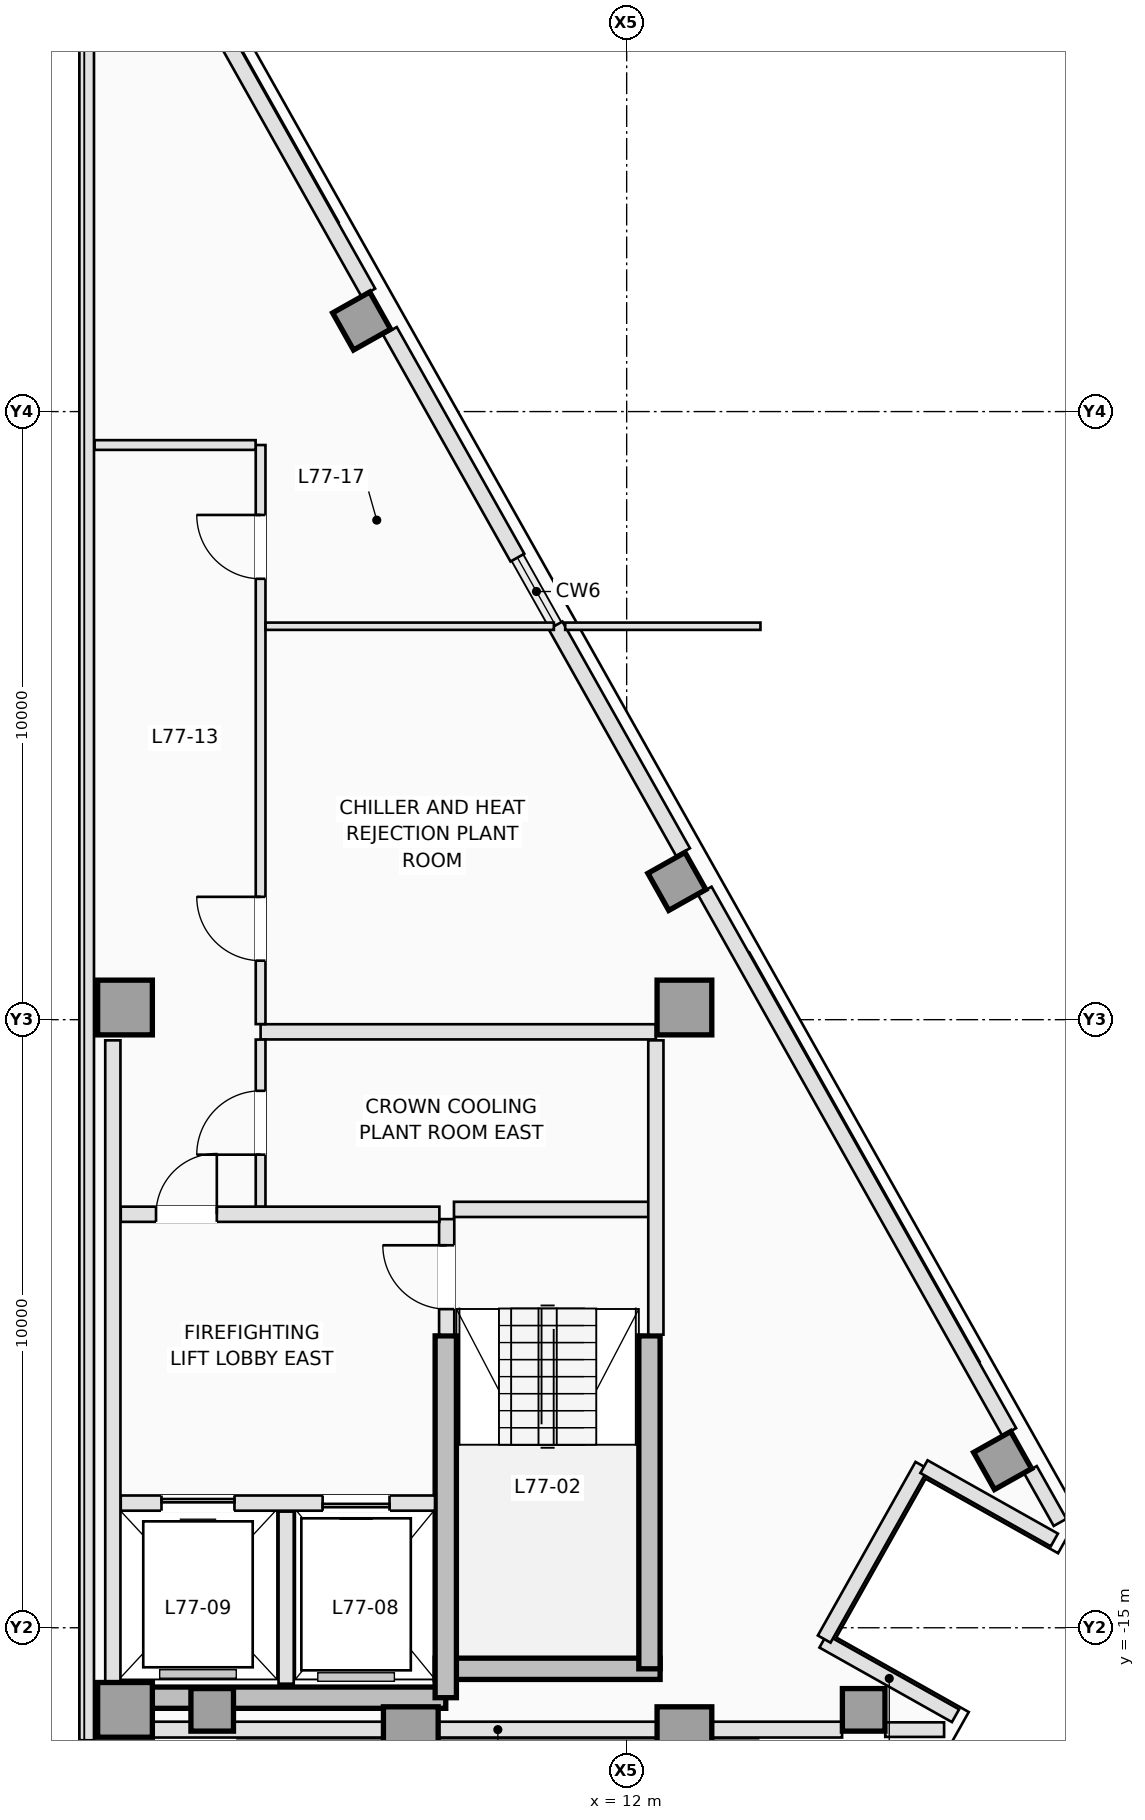
"""IFC4 building model, lengths in metres.
Left out: names, types, materials, properties, quantities, classifications, styles, units other than length and angle.
Written with IfcOpenShell. Run it as: python <this file> out.ifc"""

import sys

from ifc_helpers import new_model, si_unit, direction, frame, frame_2d, origin, origin_2d, place, context, subcontext, project, spatial, rectangle, extrude, element, fill, save


model = new_model("IFC4")
c1 = context("Model", 3, precision=1e-05, world=origin(), true_north=direction((0.0, 1.0)))
c2 = subcontext(c1, "Body", "Model", "MODEL_VIEW")
j1 = project(units=[si_unit("LENGTHUNIT", "METRE"), si_unit("PLANEANGLEUNIT", "RADIAN")], contexts=[c1])
p1 = place(None, origin())
s1 = spatial("IfcSite", under=j1, at=p1, CompositionType="ELEMENT")
p2 = place(p1, origin())
s2 = spatial("IfcBuilding", under=s1, at=p2, CompositionType="ELEMENT")
p3 = place(p2, frame((0.0, 0.0, 277.3)))
s3 = spatial("IfcBuildingStorey", under=s2, at=p3, CompositionType="ELEMENT", Elevation=277.3)
p4 = place(p3, frame((3.75, -16.15, 0.0), z_axis=(0.0, 0.0, 1.0), x_axis=(1.0, 0.0, 0.0)))
e1 = element("IfcWall", 1, at=p4, inside=s3, PredefinedType="SHEAR", context=c2, shape_type="SweptSolid", body=[
    extrude(rectangle(XDim=5.275, YDim=0.35, at=frame_2d((2.637, 0.0))), origin(), (0.0, 0.0, 1.0), 3.2),
])
p5 = place(p3, frame((8.85, -15.675, 0.0), z_axis=(0.0, 0.0, 1.0), x_axis=(1.0, 0.0, 0.0)))
e2 = element("IfcWall", 2, at=p5, inside=s3, PredefinedType="SHEAR", context=c2, shape_type="SweptSolid", body=[
    extrude(rectangle(XDim=3.7, YDim=0.35, at=frame_2d((1.85, 0.0))), origin(), (0.0, 0.0, 1.0), 3.2),
])
p6 = place(p3, frame((12.375, -15.675, 0.0), z_axis=(0.0, 0.0, 1.0), x_axis=(0.0, 1.0, 0.0)))
e3 = element("IfcWall", 3, at=p6, inside=s3, PredefinedType="SHEAR", context=c2, shape_type="SweptSolid", body=[
    extrude(rectangle(XDim=5.475, YDim=0.35, at=frame_2d((2.738, 0.0))), origin(), (0.0, 0.0, 1.0), 3.2),
])
p7 = place(p3, frame((9.025, -16.15, 0.0), z_axis=(0.0, 0.0, 1.0), x_axis=(0.0, 1.0, 0.0)))
e4 = element("IfcWall", 4, at=p7, inside=s3, PredefinedType="SHEAR", context=c2, shape_type="SweptSolid", body=[
    extrude(rectangle(XDim=5.95, YDim=0.35, at=frame_2d((2.975, 0.0))), origin(), (0.0, 0.0, 1.0), 3.2),
])
for number, where, z_axis, x_axis in (
    (5, (3.75, -16.35, 0.0), (0.0, 0.0, 1.0), (1.0, 0.0, 0.0)),
    (6, (8.45, -16.75, 0.0), (0.0, 0.0, 1.0), (1.0, 0.0, 0.0)),
    (7, (12.95, -16.75, 0.0), (0.0, 0.0, 1.0), (1.0, 0.0, 0.0)),
    (8, (3.75, -4.8, 0.0), (0.0, 0.0, 1.0), (1.0, 0.0, 0.0)),
    (9, (12.95, -4.8, 0.0), (0.0, 0.0, 1.0), (1.0, 0.0, 0.0)),
):
    element("IfcColumn", number, at=place(p3, frame(where, z_axis=z_axis, x_axis=x_axis)), inside=s3, PredefinedType="COLUMN", context=c2, shape_type="SweptSolid", body=[
        extrude(rectangle(XDim=0.9, YDim=0.9, at=origin_2d()), origin(), (0.0, 0.0, 1.0), 3.2),
    ])
for number, where, z_axis, x_axis in (
    (10, (5.184, -16.35, 0.0), (0.0, 0.0, 1.0), (0.0, 1.0, 0.0)),
    (11, (15.898, -16.35, 0.0), (0.0, 0.0, 1.0), (0.0, 1.0, 0.0)),
    (12, (18.182, -12.25, 0.0), (0.0, 0.0, 1.0), (0.872, 0.49, 0.0)),
    (13, (12.825, -2.727, 0.0), (0.0, 0.0, 1.0), (0.872, 0.49, 0.0)),
    (14, (7.642, 6.489, 0.0), (0.0, 0.0, 1.0), (0.872, 0.49, 0.0)),
):
    element("IfcColumn", number, at=place(p3, frame(where, z_axis=z_axis, x_axis=x_axis)), inside=s3, PredefinedType="COLUMN", context=c2, shape_type="SweptSolid", body=[
        extrude(rectangle(XDim=0.7, YDim=0.7, at=origin_2d()), origin(), (0.0, 0.0, 1.0), 3.2),
    ])
p8 = place(p3, frame((17.22, -16.675, 0.0), z_axis=(0.0, 0.0, 1.0), x_axis=(-1.0, 0.0, 0.0)))
e15 = element("IfcWall", 15, at=p8, inside=s3, PredefinedType="STANDARD", context=c2, shape_type="SweptSolid", body=[
    extrude(rectangle(XDim=0.967, YDim=0.24, at=frame_2d((0.484, 0.0))), origin(), (0.0, 0.0, 1.0), 2.88),
])
p9 = place(p3, frame((15.542, -16.675, 0.0), z_axis=(0.0, 0.0, 1.0), x_axis=(-1.0, 0.0, 0.0)))
e16 = element("IfcWall", 16, at=p9, inside=s3, PredefinedType="STANDARD", context=c2, shape_type="SweptSolid", body=[
    extrude(rectangle(XDim=11.323, YDim=0.26, at=frame_2d((5.661, 0.0))), origin(), (0.0, 0.0, 1.0), 2.164),
])
p10 = place(p3, frame((18.639, -12.4, 0.0), z_axis=(0.0, 0.0, 1.0), x_axis=(0.490261239633, -0.871575537125, 0.0)))
e17 = element("IfcWall", 17, at=p10, inside=s3, PredefinedType="STANDARD", context=c2, shape_type="SweptSolid", body=[
    extrude(rectangle(XDim=0.995, YDim=0.24, at=frame_2d((0.498, 0.0))), origin(), (0.0, 0.0, 1.0), 2.88),
])
p11 = place(p3, frame((2.742, 15.863, 0.0), z_axis=(0.0, 0.0, 1.0), x_axis=(0.490260105081, -0.871576175309, 0.0)))
e18 = element("IfcWall", 18, at=p11, inside=s3, PredefinedType="STANDARD", context=c2, shape_type="SweptSolid", body=[
    extrude(rectangle(XDim=10.217, YDim=0.26, at=frame_2d((5.108, 0.0))), origin(), (0.0, 0.0, 1.0), 2.88),
])
p12 = place(p3, frame((13.283, -2.877, 0.0), z_axis=(0.0, 0.0, 1.0), x_axis=(0.490270316201, -0.871570431492, 0.0)))
e19 = element("IfcWall", 19, at=p12, inside=s3, PredefinedType="STANDARD", context=c2, shape_type="SweptSolid", body=[
    extrude(rectangle(XDim=10.216, YDim=0.26, at=frame_2d((5.108, 0.0))), origin(), (0.0, 0.0, 1.0), 2.88),
])
p13 = place(p3, frame((8.106, 6.326, 0.0), z_axis=(0.0, 0.0, 1.0), x_axis=(0.490244979871, -0.871584683041, 0.0)))
e20 = element("IfcWall", 20, at=p13, inside=s3, PredefinedType="STANDARD", context=c2, shape_type="SweptSolid", body=[
    extrude(rectangle(XDim=4.277, YDim=0.26, at=frame_2d((2.139, 0.0))), origin(), (0.0, 0.0, 1.0), 2.88),
])
p14 = place(p3, frame((10.83, 1.483, 0.0), z_axis=(0.0, 0.0, 1.0), x_axis=(0.490220591932, -0.871598400209, 0.0)))
e21 = element("IfcWall", 21, at=p14, inside=s3, PredefinedType="STANDARD", context=c2, shape_type="SweptSolid", body=[
    extrude(rectangle(XDim=4.278, YDim=0.26, at=frame_2d((2.139, 0.0))), origin(), (0.0, 0.0, 1.0), 2.88),
])
p15 = place(p3, frame((17.408, -16.447, 0.0), z_axis=(0.0, 0.0, 1.0), x_axis=(-0.871588577066, 0.490238056792, 0.0)))
e22 = element("IfcWall", 22, at=p15, inside=s3, PredefinedType="STANDARD", context=c2, shape_type="SweptSolid", body=[
    extrude(rectangle(XDim=2.5, YDim=0.24, at=frame_2d((1.25, 0.0))), origin(), (0.0, 0.0, 1.0), 2.88),
])
p16 = place(p3, frame((15.248, -15.186, 0.0), z_axis=(0.0, 0.0, 1.0), x_axis=(0.490293083368, 0.871557624258, 0.0)))
e23 = element("IfcWall", 23, at=p16, inside=s3, PredefinedType="STANDARD", context=c2, shape_type="SweptSolid", body=[
    extrude(rectangle(XDim=3.276, YDim=0.24, at=frame_2d((1.638, 0.0))), origin(), (0.0, 0.0, 1.0), 2.164),
])
p17 = place(p3, frame((16.889, -12.35, 0.0), z_axis=(0.0, 0.0, 1.0), x_axis=(0.87157023615, -0.490270663468, 0.0)))
e24 = element("IfcWall", 24, at=p17, inside=s3, PredefinedType="STANDARD", context=c2, shape_type="SweptSolid", body=[
    extrude(rectangle(XDim=2.46, YDim=0.24, at=frame_2d((1.23, 0.0))), origin(), (0.0, 0.0, 1.0), 2.88),
])
p18 = place(p3, frame((3.12, -16.85, 0.0), z_axis=(0.0, 0.0, 1.0), x_axis=(0.0, 1.0, 0.0)))
e25 = element("IfcWall", 25, at=p18, inside=s3, PredefinedType="STANDARD", context=c2, shape_type="SweptSolid", body=[
    extrude(rectangle(XDim=34.05, YDim=0.24, at=frame_2d((17.025, 0.0))), origin(), (0.0, 0.0, 1.0), 2.164),
])
p19 = place(p3, frame((9.04, -10.18, 0.0), z_axis=(0.0, 0.0, 1.0), x_axis=(0.0, 1.0, 0.0)))
e26 = element("IfcWall", 26, at=p19, inside=s3, PredefinedType="PARTITIONING", context=c2, shape_type="SweptSolid", body=[
    extrude(rectangle(XDim=1.9, YDim=0.25, at=frame_2d((0.95, 0.0))), origin(), (0.0, 0.0, 1.0), 2.88),
])
p20 = place(p19, frame((0.42, 0.0, 0.0)))
e27 = element("IfcOpeningElement", 27, at=p20, cuts=e26, PredefinedType="OPENING", context=c2, shape_type="SweptSolid", body=[
    extrude(rectangle(XDim=1.05, YDim=2.15, at=frame_2d((0.525, 1.075))), frame((0.0, 0.135, 0.0), z_axis=(0.0, -1.0, 0.0), x_axis=(1.0, 0.0, 0.0)), (0.0, 0.0, 1.0), 0.27),
])
p21 = place(p3, frame((9.16, -8.12, 0.0), z_axis=(0.0, 0.0, 1.0), x_axis=(1.0, 0.0, 0.0)))
e28 = element("IfcWall", 28, at=p21, inside=s3, PredefinedType="PARTITIONING", context=c2, shape_type="SweptSolid", body=[
    extrude(rectangle(XDim=3.22, YDim=0.25, at=frame_2d((1.61, 0.0))), origin(), (0.0, 0.0, 1.0), 2.88),
])
p22 = place(p3, frame((12.48, -10.18, 0.0), z_axis=(0.0, 0.0, 1.0), x_axis=(0.0, 1.0, 0.0)))
e29 = element("IfcWall", 29, at=p22, inside=s3, PredefinedType="PARTITIONING", context=c2, shape_type="SweptSolid", body=[
    extrude(rectangle(XDim=4.84, YDim=0.25, at=frame_2d((2.42, 0.0))), origin(), (0.0, 0.0, 1.0), 2.88),
])
p23 = place(p3, frame((3.68, -12.95, 0.0), z_axis=(0.0, 0.0, 1.0), x_axis=(1.0, 0.0, 0.0)))
e30 = element("IfcWall", 30, at=p23, inside=s3, PredefinedType="PARTITIONING", context=c2, shape_type="SweptSolid", body=[
    extrude(rectangle(XDim=5.168, YDim=0.25, at=frame_2d((2.584, 0.0))), origin(), (0.0, 0.0, 1.0), 2.88),
])
p24 = place(p23, frame((3.32, 0.0, 0.0)))
e31 = element("IfcOpeningElement", 31, at=p24, cuts=e30, PredefinedType="OPENING", context=c2, shape_type="SweptSolid", body=[
    extrude(rectangle(XDim=1.1, YDim=2.15, at=frame_2d((0.55, 1.075))), frame((0.0, 0.135, 0.0), z_axis=(0.0, -1.0, 0.0), x_axis=(1.0, 0.0, 0.0)), (0.0, 0.0, 1.0), 0.27),
])
p25 = place(p23, frame((0.67, 0.0, 0.0)))
e32 = element("IfcOpeningElement", 32, at=p25, cuts=e30, PredefinedType="OPENING", context=c2, shape_type="SweptSolid", body=[
    extrude(rectangle(XDim=1.2, YDim=2.15, at=frame_2d((0.6, 1.075))), frame((0.0, 0.135, 0.0), z_axis=(0.0, -1.0, 0.0), x_axis=(1.0, 0.0, 0.0)), (0.0, 0.0, 1.0), 0.27),
])
p26 = place(p3, frame((6.4, -15.92, 0.0), z_axis=(0.0, 0.0, 1.0), x_axis=(0.0, 1.0, 0.0)))
e33 = element("IfcWall", 33, at=p26, inside=s3, PredefinedType="PARTITIONING", context=c2, shape_type="SweptSolid", body=[
    extrude(rectangle(XDim=2.83, YDim=0.25, at=frame_2d((1.415, 0.0))), origin(), (0.0, 0.0, 1.0), 2.88),
])
p27 = place(p3, frame((3.68, -8.2, 0.0), z_axis=(0.0, 0.0, 1.0), x_axis=(1.0, 0.0, 0.0)))
e34 = element("IfcWall", 34, at=p27, inside=s3, PredefinedType="PARTITIONING", context=c2, shape_type="SweptSolid", body=[
    extrude(rectangle(XDim=5.24, YDim=0.25, at=frame_2d((2.62, 0.0))), origin(), (0.0, 0.0, 1.0), 2.88),
])
p28 = place(p27, frame((0.58, 0.0, 0.0)))
e35 = element("IfcOpeningElement", 35, at=p28, cuts=e34, PredefinedType="OPENING", context=c2, shape_type="SweptSolid", body=[
    extrude(rectangle(XDim=1.0, YDim=2.15, at=frame_2d((0.5, 1.075))), frame((0.0, 0.135, 0.0), z_axis=(0.0, -1.0, 0.0), x_axis=(1.0, 0.0, 0.0)), (0.0, 0.0, 1.0), 0.27),
])
p29 = place(p3, frame((3.55, -15.898, 0.0), z_axis=(0.0, 0.0, 1.0), x_axis=(0.0, 1.0, 0.0)))
e36 = element("IfcWall", 36, at=p29, inside=s3, PredefinedType="PARTITIONING", context=c2, shape_type="SweptSolid", body=[
    extrude(rectangle(XDim=10.558, YDim=0.25, at=frame_2d((5.279, 0.0))), origin(), (0.0, 0.0, 1.0), 2.88),
])
p30 = place(p3, frame((5.98, -5.2, 0.0), z_axis=(0.0, 0.0, 1.0), x_axis=(1.0, 0.0, 0.0)))
e37 = element("IfcWall", 37, at=p30, inside=s3, PredefinedType="PARTITIONING", context=c2, shape_type="SweptSolid", body=[
    extrude(rectangle(XDim=6.5, YDim=0.25, at=frame_2d((3.25, 0.0))), origin(), (0.0, 0.0, 1.0), 2.88),
])
p31 = place(p3, frame((5.98, -8.073, 0.0), z_axis=(0.0, 0.0, 1.0), x_axis=(0.0, 1.0, 0.0)))
e38 = element("IfcWall", 38, at=p31, inside=s3, PredefinedType="PARTITIONING", context=c2, shape_type="SweptSolid", body=[
    extrude(rectangle(XDim=2.746, YDim=0.16, at=frame_2d((1.373, 0.0))), origin(), (0.0, 0.0, 1.0), 2.88),
])
p32 = place(p31, frame((0.853, 0.0, 0.0)))
e39 = element("IfcOpeningElement", 39, at=p32, cuts=e38, PredefinedType="OPENING", context=c2, shape_type="SweptSolid", body=[
    extrude(rectangle(XDim=1.05, YDim=2.12, at=frame_2d((0.525, 1.06))), frame((0.0, 0.09, 0.0), z_axis=(0.0, -1.0, 0.0), x_axis=(1.0, 0.0, 0.0)), (0.0, 0.0, 1.0), 0.18),
])
p33 = place(p3, frame((5.98, -5.073, 0.0), z_axis=(0.0, 0.0, 1.0), x_axis=(0.0, 1.0, 0.0)))
e40 = element("IfcWall", 40, at=p33, inside=s3, PredefinedType="PARTITIONING", context=c2, shape_type="SweptSolid", body=[
    extrude(rectangle(XDim=9.523, YDim=0.16, at=frame_2d((4.761, 0.0))), origin(), (0.0, 0.0, 1.0), 2.88),
])
p34 = place(p33, frame((1.043, 0.0, 0.0)))
e41 = element("IfcOpeningElement", 41, at=p34, cuts=e40, PredefinedType="OPENING", context=c2, shape_type="SweptSolid", body=[
    extrude(rectangle(XDim=1.05, YDim=2.12, at=frame_2d((0.525, 1.06))), frame((0.0, 0.09, 0.0), z_axis=(0.0, -1.0, 0.0), x_axis=(1.0, 0.0, 0.0)), (0.0, 0.0, 1.0), 0.18),
])
p35 = place(p33, frame((7.323, 0.0, 0.0)))
e42 = element("IfcOpeningElement", 42, at=p35, cuts=e40, PredefinedType="OPENING", context=c2, shape_type="SweptSolid", body=[
    extrude(rectangle(XDim=1.05, YDim=2.12, at=frame_2d((0.525, 1.06))), frame((0.0, 0.09, 0.0), z_axis=(0.0, -1.0, 0.0), x_axis=(1.0, 0.0, 0.0)), (0.0, 0.0, 1.0), 0.18),
])
p36 = place(p3, frame((3.25, 4.45, 0.0), z_axis=(0.0, 0.0, 1.0), x_axis=(1.0, 0.0, 0.0)))
e43 = element("IfcWall", 43, at=p36, inside=s3, PredefinedType="PARTITIONING", context=c2, shape_type="SweptSolid", body=[
    extrude(rectangle(XDim=2.648, YDim=0.16, at=frame_2d((1.324, 0.0))), origin(), (0.0, 0.0, 1.0), 2.88),
])
p37 = place(p3, frame((6.062, 1.47, 0.0), z_axis=(0.0, 0.0, 1.0), x_axis=(1.0, 0.0, 0.0)))
e44 = element("IfcWall", 44, at=p37, inside=s3, PredefinedType="PARTITIONING", context=c2, shape_type="SweptSolid", body=[
    extrude(rectangle(XDim=4.74, YDim=0.12, at=frame_2d((2.37, 0.0))), origin(), (0.0, 0.0, 1.0), 2.88),
])
p38 = place(p3, frame((10.989, 1.47, 0.0), z_axis=(0.0, 0.0, 1.0), x_axis=(1.0, 0.0, 0.0)))
e45 = element("IfcWall", 45, at=p38, inside=s3, PredefinedType="PARTITIONING", context=c2, shape_type="SweptSolid", body=[
    extrude(rectangle(XDim=3.211, YDim=0.12, at=frame_2d((1.605, 0.0))), origin(), (0.0, 0.0, 1.0), 2.88),
])
p39 = place(p24, origin())
e46 = element("IfcDoor", 46, at=p39, inside=s3, OperationType="SLIDING_TO_RIGHT", PredefinedType="DOOR", context=c2, shape_type="SweptSolid", body=[
    extrude(rectangle(XDim=1.1, YDim=2.15, at=frame_2d((0.55, 1.075))), frame((0.0, 0.025, 0.0), z_axis=(0.0, -1.0, 0.0), x_axis=(1.0, 0.0, 0.0)), (0.0, 0.0, 1.0), 0.05),
])
fill(e31, e46)
p40 = place(p25, origin())
e47 = element("IfcDoor", 47, at=p40, inside=s3, OperationType="SLIDING_TO_LEFT", PredefinedType="DOOR", context=c2, shape_type="SweptSolid", body=[
    extrude(rectangle(XDim=1.2, YDim=2.15, at=frame_2d((0.6, 1.075))), frame((0.0, 0.025, 0.0), z_axis=(0.0, -1.0, 0.0), x_axis=(1.0, 0.0, 0.0)), (0.0, 0.0, 1.0), 0.05),
])
fill(e32, e47)
p41 = place(p20, origin())
e48 = element("IfcDoor", 48, at=p41, inside=s3, OperationType="SINGLE_SWING_RIGHT", PredefinedType="DOOR", context=c2, shape_type="SweptSolid", body=[
    extrude(rectangle(XDim=1.05, YDim=2.15, at=frame_2d((0.525, 1.075))), frame((0.0, 0.025, 0.0), z_axis=(0.0, -1.0, 0.0), x_axis=(1.0, 0.0, 0.0)), (0.0, 0.0, 1.0), 0.05),
])
fill(e27, e48)
p42 = place(p28, origin())
e49 = element("IfcDoor", 49, at=p42, inside=s3, OperationType="SINGLE_SWING_RIGHT", PredefinedType="DOOR", context=c2, shape_type="SweptSolid", body=[
    extrude(rectangle(XDim=1.0, YDim=2.15, at=frame_2d((0.5, 1.075))), frame((0.0, 0.025, 0.0), z_axis=(0.0, -1.0, 0.0), x_axis=(1.0, 0.0, 0.0)), (0.0, 0.0, 1.0), 0.05),
])
fill(e35, e49)
p43 = place(p32, origin())
e50 = element("IfcDoor", 50, at=p43, inside=s3, OperationType="SINGLE_SWING_LEFT", PredefinedType="DOOR", context=c2, shape_type="SweptSolid", body=[
    extrude(rectangle(XDim=1.05, YDim=2.12, at=frame_2d((0.525, 1.06))), frame((0.0, 0.025, 0.0), z_axis=(0.0, -1.0, 0.0), x_axis=(1.0, 0.0, 0.0)), (0.0, 0.0, 1.0), 0.05),
])
fill(e39, e50)
p44 = place(p34, origin())
e51 = element("IfcDoor", 51, at=p44, inside=s3, OperationType="SINGLE_SWING_RIGHT", PredefinedType="DOOR", context=c2, shape_type="SweptSolid", body=[
    extrude(rectangle(XDim=1.05, YDim=2.12, at=frame_2d((0.525, 1.06))), frame((0.0, 0.025, 0.0), z_axis=(0.0, -1.0, 0.0), x_axis=(1.0, 0.0, 0.0)), (0.0, 0.0, 1.0), 0.05),
])
fill(e41, e51)
p45 = place(p35, origin())
e52 = element("IfcDoor", 52, at=p45, inside=s3, OperationType="SINGLE_SWING_RIGHT", PredefinedType="DOOR", context=c2, shape_type="SweptSolid", body=[
    extrude(rectangle(XDim=1.05, YDim=2.12, at=frame_2d((0.525, 1.06))), frame((0.0, 0.025, 0.0), z_axis=(0.0, -1.0, 0.0), x_axis=(1.0, 0.0, 0.0)), (0.0, 0.0, 1.0), 0.05),
])
fill(e42, e52)
save(model, sys.argv[1])
